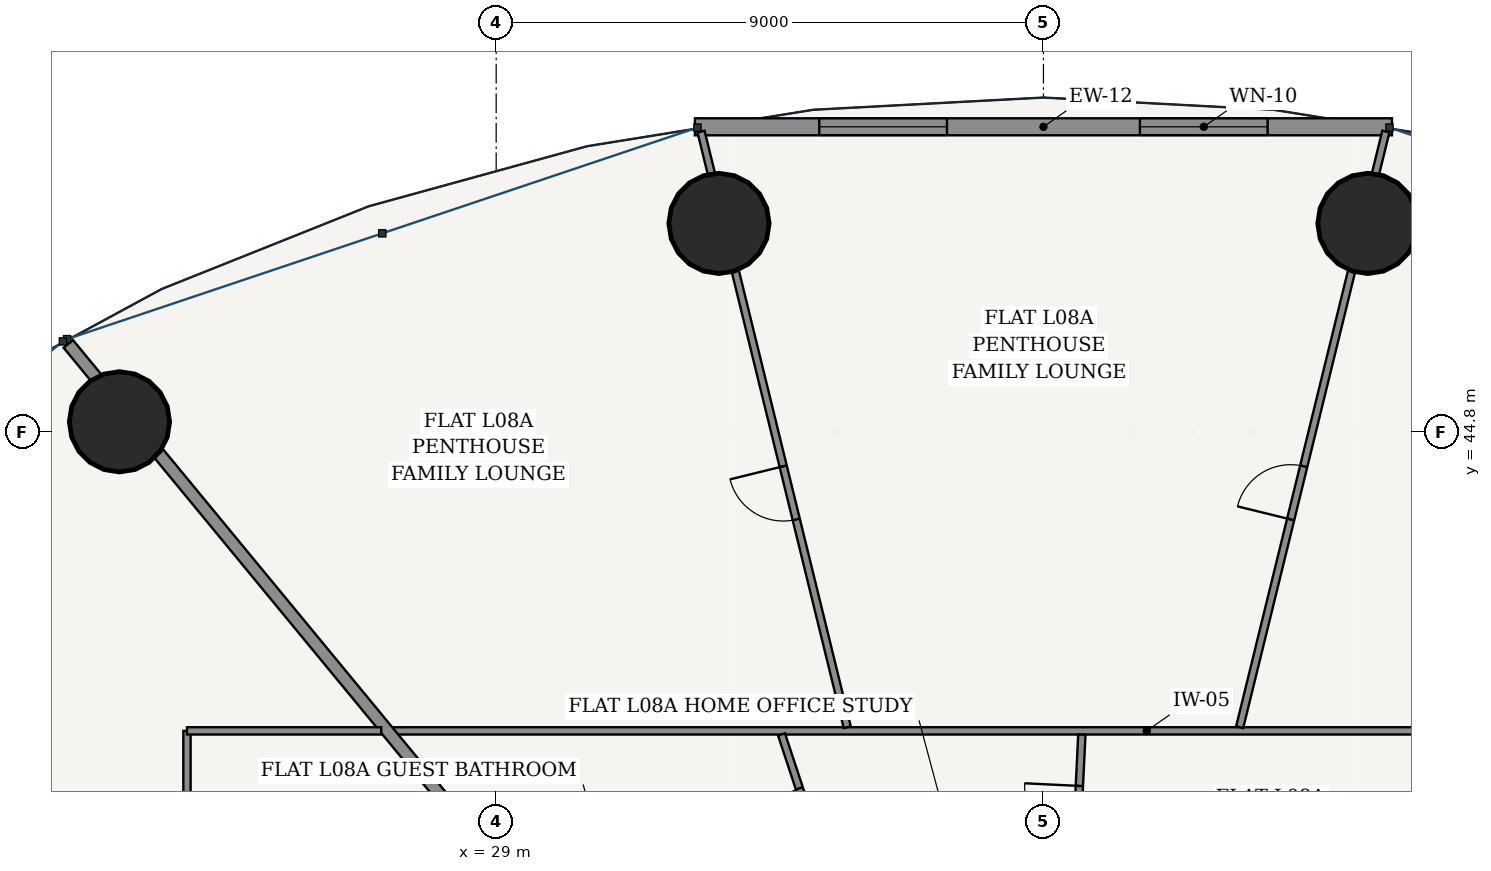
"""IFC4 building model, lengths in metres.
Left out: names, types, materials, properties, quantities, classifications, styles, units other than length and angle.
Written with IfcOpenShell. Run it as: python <this file> out.ifc"""

import sys

from ifc_helpers import new_model, si_unit, direction, frame, frame_2d, origin, origin_2d, place, context, subcontext, project, spatial, rectangle, hollow_circle, extrude, source, transform, mapped, element, fill, save


model = new_model("IFC4")
c1 = context("Model", 3, precision=1e-05, world=origin(), true_north=direction((-0.2419218956, 0.970295726276)))
c2 = subcontext(c1, "Body", "Model", "MODEL_VIEW")
j1 = project(units=[si_unit("LENGTHUNIT", "METRE"), si_unit("PLANEANGLEUNIT", "RADIAN")], contexts=[c1])
p1 = place(None, origin())
s1 = spatial("IfcSite", under=j1, at=p1, CompositionType="ELEMENT")
p2 = place(p1, origin())
s2 = spatial("IfcBuilding", under=s1, at=p2, CompositionType="ELEMENT")
p3 = place(p2, frame((0.0, 0.0, 34.8)))
s3 = spatial("IfcBuildingStorey", under=s2, at=p3, CompositionType="ELEMENT", Elevation=34.8)
for number, where, z_axis, x_axis in (
    (1, (43.336, 48.23, 0.0), (0.0, 0.0, 1.0), (1.0, 0.0, 0.0)),
    (2, (32.664, 48.23, 0.0), (0.0, 0.0, 1.0), (1.0, 0.0, 0.0)),
    (3, (22.805, 44.968, 0.0), (0.0, 0.0, 1.0), (1.0, 0.0, 0.0)),
):
    element("IfcColumn", number, at=place(p3, frame(where, z_axis=z_axis, x_axis=x_axis)), inside=s3, PredefinedType="COLUMN", context=c2, shape_type="SweptSolid", body=[
        extrude(hollow_circle(Radius=0.825, WallThickness=0.05, at=origin_2d()), origin(), (0.0, 0.0, 1.0), 3.6),
    ])
p4 = place(p3, frame((43.732, 49.819, 0.0), z_axis=(0.0, 0.0, 1.0), x_axis=(-1.0, 0.0, 0.0)))
e4 = element("IfcWall", 4, at=p4, inside=s3, PredefinedType="SOLIDWALL", context=c2, shape_type="SweptSolid", body=[
    extrude(rectangle(XDim=11.463, YDim=0.28, at=frame_2d((5.732, 0.0))), origin(), (0.0, 0.0, 1.0), 3.32),
])
p5 = place(p4, frame((2.045, 0.0, 0.85)))
e5 = element("IfcOpeningElement", 5, at=p5, cuts=e4, PredefinedType="OPENING", context=c2, shape_type="SweptSolid", body=[
    extrude(rectangle(XDim=2.1, YDim=1.95, at=frame_2d((1.05, 0.975))), frame((0.0, 0.15, 0.0), z_axis=(0.0, -1.0, 0.0), x_axis=(1.0, 0.0, 0.0)), (0.0, 0.0, 1.0), 0.3),
])
p6 = place(p4, frame((7.318, 0.0, 0.85)))
e6 = element("IfcOpeningElement", 6, at=p6, cuts=e4, PredefinedType="OPENING", context=c2, shape_type="SweptSolid", body=[
    extrude(rectangle(XDim=2.1, YDim=1.95, at=frame_2d((1.05, 0.975))), frame((0.0, 0.15, 0.0), z_axis=(0.0, -1.0, 0.0), x_axis=(1.0, 0.0, 0.0)), (0.0, 0.0, 1.0), 0.3),
])
p7 = place(p3, frame((27.312, 39.885, 0.0), z_axis=(0.0, 0.0, 1.0), x_axis=(1.0, 0.0, 0.0)))
e7 = element("IfcWall", 7, at=p7, inside=s3, PredefinedType="PARTITIONING", context=c2, shape_type="SweptSolid", body=[
    extrude(rectangle(XDim=24.772, YDim=0.12, at=frame_2d((12.386, 0.0))), origin(), (0.0, 0.0, 1.0), 2.688),
])
p8 = place(p3, frame((41.227, 39.945, 0.0), z_axis=(0.0, 0.0, 1.0), x_axis=(0.238375747469, 0.97117300365, 0.0)))
e8 = element("IfcWall", 8, at=p8, inside=s3, PredefinedType="PARTITIONING", context=c2, shape_type="SweptSolid", body=[
    extrude(rectangle(XDim=10.086, YDim=0.12, at=frame_2d((5.043, 0.0))), origin(), (0.0, 0.0, 1.0), 2.688),
])
p9 = place(p8, frame((3.519, 0.0, 0.0)))
e9 = element("IfcOpeningElement", 9, at=p9, cuts=e8, PredefinedType="OPENING", context=c2, shape_type="SweptSolid", body=[
    extrude(rectangle(XDim=0.9, YDim=2.15, at=frame_2d((0.45, 1.075))), frame((0.0, 0.07, 0.0), z_axis=(0.0, -1.0, 0.0), x_axis=(1.0, 0.0, 0.0)), (0.0, 0.0, 1.0), 0.14),
])
p10 = place(p3, frame((34.773, 39.945, 0.0), z_axis=(0.0, 0.0, 1.0), x_axis=(-0.238375747469, 0.97117300365, 0.0)))
e10 = element("IfcWall", 10, at=p10, inside=s3, PredefinedType="PARTITIONING", context=c2, shape_type="SweptSolid", body=[
    extrude(rectangle(XDim=10.086, YDim=0.12, at=frame_2d((5.043, 0.0))), origin(), (0.0, 0.0, 1.0), 2.688),
])
p11 = place(p10, frame((3.518, 0.0, 0.0)))
e11 = element("IfcOpeningElement", 11, at=p11, cuts=e10, PredefinedType="OPENING", context=c2, shape_type="SweptSolid", body=[
    extrude(rectangle(XDim=0.9, YDim=2.15, at=frame_2d((0.45, 1.075))), frame((0.0, 0.07, 0.0), z_axis=(0.0, -1.0, 0.0), x_axis=(1.0, 0.0, 0.0)), (0.0, 0.0, 1.0), 0.14),
])
p12 = place(p3, frame((38.506, 37.237, 0.0), z_axis=(0.0, 0.0, 1.0), x_axis=(0.048376073987, 0.998829192338, 0.0)))
e12 = element("IfcWall", 12, at=p12, inside=s3, PredefinedType="PARTITIONING", context=c2, shape_type="SweptSolid", body=[
    extrude(rectangle(XDim=2.589, YDim=0.12, at=frame_2d((1.294, 0.0))), origin(), (0.0, 0.0, 1.0), 3.32),
])
p13 = place(p12, frame((0.844, 0.0, 0.0)))
e13 = element("IfcOpeningElement", 13, at=p13, cuts=e12, PredefinedType="OPENING", context=c2, shape_type="SweptSolid", body=[
    extrude(rectangle(XDim=0.9, YDim=2.15, at=frame_2d((0.45, 1.075))), frame((0.0, 0.07, 0.0), z_axis=(0.0, -1.0, 0.0), x_axis=(1.0, 0.0, 0.0)), (0.0, 0.0, 1.0), 0.14),
])
p14 = place(p3, frame((34.549, 37.237, 0.0), z_axis=(0.0, 0.0, 1.0), x_axis=(-0.313863409377, 0.949468145992, 0.0)))
e14 = element("IfcWall", 14, at=p14, inside=s3, PredefinedType="PARTITIONING", context=c2, shape_type="SweptSolid", body=[
    extrude(rectangle(XDim=2.727, YDim=0.12, at=frame_2d((1.364, 0.0))), origin(), (0.0, 0.0, 1.0), 3.32),
])
p15 = place(p14, frame((0.934, 0.0, 0.0)))
e15 = element("IfcOpeningElement", 15, at=p15, cuts=e14, PredefinedType="OPENING", context=c2, shape_type="SweptSolid", body=[
    extrude(rectangle(XDim=0.86, YDim=2.15, at=frame_2d((0.43, 1.075))), frame((0.0, 0.07, 0.0), z_axis=(0.0, -1.0, 0.0), x_axis=(1.0, 0.0, 0.0)), (0.0, 0.0, 1.0), 0.14),
])
p16 = place(p3, frame((29.395, 37.237, 0.0), z_axis=(0.0, 0.0, 1.0), x_axis=(-0.636195770442, 0.77152766747, 0.0)))
e16 = element("IfcWall", 16, at=p16, inside=s3, PredefinedType="PARTITIONING", context=c2, shape_type="SweptSolid", body=[
    extrude(rectangle(XDim=11.681, YDim=0.2, at=frame_2d((5.84, 0.0))), origin(), (0.0, 0.0, 1.0), 2.688),
])
p17 = place(p3, frame((23.915, 13.715, 0.0), z_axis=(0.0, 0.0, 1.0), x_axis=(0.0, 1.0, 0.0)))
e17 = element("IfcWall", 17, at=p17, inside=s3, PredefinedType="PARTITIONING", context=c2, shape_type="SweptSolid", body=[
    extrude(rectangle(XDim=26.17, YDim=0.12, at=frame_2d((13.085, 0.0))), origin(), (0.0, 0.0, 1.0), 2.688),
])
p18 = place(p17, frame((1.895, 0.0, 0.0)))
e18 = element("IfcOpeningElement", 18, at=p18, cuts=e17, PredefinedType="OPENING", context=c2, shape_type="SweptSolid", body=[
    extrude(rectangle(XDim=0.9, YDim=2.15, at=frame_2d((0.45, 1.075))), frame((0.0, 0.07, 0.0), z_axis=(0.0, -1.0, 0.0), x_axis=(1.0, 0.0, 0.0)), (0.0, 0.0, 1.0), 0.14),
])
p19 = place(p17, frame((11.498, 0.0, 0.0)))
e19 = element("IfcOpeningElement", 19, at=p19, cuts=e17, PredefinedType="OPENING", context=c2, shape_type="SweptSolid", body=[
    extrude(rectangle(XDim=0.9, YDim=2.15, at=frame_2d((0.45, 1.075))), frame((0.0, 0.07, 0.0), z_axis=(0.0, -1.0, 0.0), x_axis=(1.0, 0.0, 0.0)), (0.0, 0.0, 1.0), 0.14),
])
p20 = place(p17, frame((23.831, 0.0, 0.0)))
e20 = element("IfcOpeningElement", 20, at=p20, cuts=e17, PredefinedType="OPENING", context=c2, shape_type="SweptSolid", body=[
    extrude(rectangle(XDim=0.86, YDim=2.15, at=frame_2d((0.43, 1.075))), frame((0.0, 0.07, 0.0), z_axis=(0.0, -1.0, 0.0), x_axis=(1.0, 0.0, 0.0)), (0.0, 0.0, 1.0), 0.14),
])
p21 = place(p3, frame((23.915, 39.885, 0.0), z_axis=(0.0, 0.0, 1.0), x_axis=(1.0, 0.0, 0.0)))
e21 = element("IfcWall", 21, at=p21, inside=s3, PredefinedType="PARTITIONING", context=c2, shape_type="SweptSolid", body=[
    extrude(rectangle(XDim=3.194, YDim=0.12, at=frame_2d((1.597, 0.0))), origin(), (0.0, 0.0, 1.0), 2.688),
])
m1 = source(origin(), c2, "Body", "SweptSolid", [
    extrude(rectangle(XDim=2.1, YDim=1.95, at=frame_2d((1.05, 0.975))), frame((0.0, 0.03, 0.0), z_axis=(0.0, -1.0, 0.0), x_axis=(1.0, 0.0, 0.0)), (0.0, 0.0, 1.0), 0.06),
])
p22 = place(p5, origin())
e22 = element("IfcWindow", 22, at=p22, inside=s3, PartitioningType="SINGLE_PANEL", PredefinedType="WINDOW", context=c2, shape_type="MappedRepresentation", body=[
    mapped(m1, transform((0.0, 0.0, 0.0), scale=1.0)),
])
fill(e5, e22)
p23 = place(p6, origin())
e23 = element("IfcWindow", 23, at=p23, inside=s3, PartitioningType="SINGLE_PANEL", PredefinedType="WINDOW", context=c2, shape_type="MappedRepresentation", body=[
    mapped(m1, transform((0.0, 0.0, 0.0), scale=1.0)),
])
fill(e6, e23)
m2 = source(origin(), c2, "Body", "SweptSolid", [
    extrude(rectangle(XDim=0.9, YDim=2.15, at=frame_2d((0.45, 1.075))), frame((0.0, 0.025, 0.0), z_axis=(0.0, -1.0, 0.0), x_axis=(1.0, 0.0, 0.0)), (0.0, 0.0, 1.0), 0.05),
])
p24 = place(p13, origin())
e24 = element("IfcDoor", 24, at=p24, inside=s3, OperationType="SINGLE_SWING_RIGHT", PredefinedType="DOOR", context=c2, shape_type="MappedRepresentation", body=[
    mapped(m2, transform((0.0, 0.0, 0.0), scale=1.0)),
])
fill(e13, e24)
m3 = source(origin(), c2, "Body", "SweptSolid", [
    extrude(rectangle(XDim=0.86, YDim=2.15, at=frame_2d((0.43, 1.075))), frame((0.0, 0.025, 0.0), z_axis=(0.0, -1.0, 0.0), x_axis=(1.0, 0.0, 0.0)), (0.0, 0.0, 1.0), 0.05),
])
p25 = place(p15, origin())
e25 = element("IfcDoor", 25, at=p25, inside=s3, OperationType="SINGLE_SWING_LEFT", PredefinedType="DOOR", context=c2, shape_type="MappedRepresentation", body=[
    mapped(m3, transform((0.0, 0.0, 0.0), scale=1.0)),
])
fill(e15, e25)
p26 = place(p9, origin())
e26 = element("IfcDoor", 26, at=p26, inside=s3, OperationType="SINGLE_SWING_LEFT", PredefinedType="DOOR", context=c2, shape_type="MappedRepresentation", body=[
    mapped(m2, transform((0.0, 0.0, 0.0), scale=1.0)),
])
fill(e9, e26)
p27 = place(p11, origin())
e27 = element("IfcDoor", 27, at=p27, inside=s3, OperationType="SINGLE_SWING_RIGHT", PredefinedType="DOOR", context=c2, shape_type="MappedRepresentation", body=[
    mapped(m2, transform((0.0, 0.0, 0.0), scale=1.0)),
])
fill(e11, e27)
save(model, sys.argv[1])
